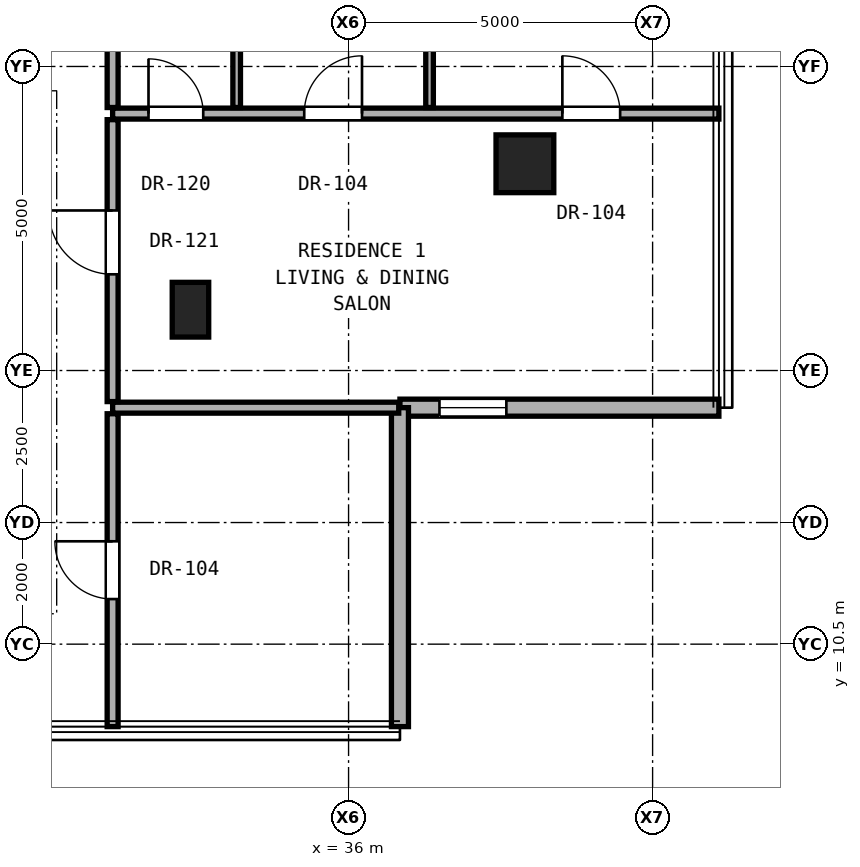
"""IFC4 building model, lengths in metres.
Left out: names, types, materials, properties, quantities, classifications, styles, units other than length and angle.
Written with IfcOpenShell. Run it as: python <this file> out.ifc"""

import sys

from ifc_helpers import new_model, si_unit, direction, frame, frame_2d, origin, origin_2d, place, context, subcontext, project, spatial, rectangle, hollow_rectangle, extrude, element, fill, save


model = new_model("IFC4")
c1 = context("Model", 3, precision=1e-05, world=origin(), true_north=direction((0.0, 1.0)))
c2 = subcontext(c1, "Body", "Model", "MODEL_VIEW")
j1 = project(units=[si_unit("LENGTHUNIT", "METRE"), si_unit("PLANEANGLEUNIT", "RADIAN")], contexts=[c1])
p1 = place(None, origin())
s1 = spatial("IfcSite", under=j1, at=p1, CompositionType="ELEMENT")
p2 = place(p1, origin())
s2 = spatial("IfcBuilding", under=s1, at=p2, CompositionType="ELEMENT")
p3 = place(p2, frame((0.0, 0.0, 177.15)))
s3 = spatial("IfcBuildingStorey", under=s2, at=p3, CompositionType="ELEMENT", Elevation=177.15)
p4 = place(p3, frame((38.9, 18.4, 0.0), z_axis=(0.0, 0.0, 1.0), x_axis=(1.0, 0.0, 0.0)))
e1 = element("IfcColumn", 1, at=p4, inside=s3, PredefinedType="COLUMN", context=c2, shape_type="SweptSolid", body=[
    extrude(hollow_rectangle(XDim=0.95, YDim=0.95, WallThickness=0.05, at=origin_2d()), origin(), (0.0, 0.0, 1.0), 3.25),
])
p5 = place(p3, frame((33.4, 16.0, 0.0), z_axis=(0.0, 0.0, 1.0), x_axis=(1.0, 0.0, 0.0)))
e2 = element("IfcColumn", 2, at=p5, inside=s3, PredefinedType="PILASTER", context=c2, shape_type="SweptSolid", body=[
    extrude(rectangle(XDim=0.6, YDim=0.9, at=origin_2d()), origin(), (0.0, 0.0, 1.0), 3.25),
])
p6 = place(p3, frame((36.845, 14.389, 0.0), z_axis=(0.0, 0.0, 1.0), x_axis=(1.0, 0.0, 0.0)))
e3 = element("IfcWall", 3, at=p6, inside=s3, PredefinedType="SOLIDWALL", context=c2, shape_type="SweptSolid", body=[
    extrude(rectangle(XDim=5.245, YDim=0.28, at=frame_2d((2.623, 0.0))), origin(), (0.0, 0.0, 1.0), 3.03),
])
p7 = place(p6, frame((0.65, 0.0, 0.85)))
e4 = element("IfcOpeningElement", 4, at=p7, cuts=e3, PredefinedType="OPENING", context=c2, shape_type="SweptSolid", body=[
    extrude(rectangle(XDim=1.1, YDim=2.0, at=frame_2d((0.55, 1.0))), frame((0.0, 0.15, 0.0), z_axis=(0.0, -1.0, 0.0), x_axis=(1.0, 0.0, 0.0)), (0.0, 0.0, 1.0), 0.3),
])
p8 = place(p3, frame((36.845, 9.144, 0.0), z_axis=(0.0, 0.0, 1.0), x_axis=(0.0, 1.0, 0.0)))
e5 = element("IfcWall", 5, at=p8, inside=s3, PredefinedType="SOLIDWALL", context=c2, shape_type="SweptSolid", body=[
    extrude(rectangle(XDim=5.245, YDim=0.28, at=frame_2d((2.623, 0.0))), origin(), (0.0, 0.0, 1.0), 3.03),
])
p9 = place(p3, frame((32.12, 14.389, 0.0), z_axis=(0.0, 0.0, 1.0), x_axis=(1.0, 0.0, 0.0)))
e6 = element("IfcWall", 6, at=p9, inside=s3, PredefinedType="PARTITIONING", context=c2, shape_type="SweptSolid", body=[
    extrude(rectangle(XDim=4.705, YDim=0.18, at=frame_2d((2.353, 0.0))), origin(), (0.0, 0.0, 1.0), 3.05),
])
p10 = place(p3, frame((32.12, 19.225, 0.0), z_axis=(0.0, 0.0, 1.0), x_axis=(1.0, 0.0, 0.0)))
e7 = element("IfcWall", 7, at=p10, inside=s3, PredefinedType="PARTITIONING", context=c2, shape_type="SweptSolid", body=[
    extrude(rectangle(XDim=9.97, YDim=0.18, at=frame_2d((4.985, 0.0))), origin(), (0.0, 0.0, 1.0), 2.269),
])
p11 = place(p10, frame((7.396, 0.0, 0.0)))
e8 = element("IfcOpeningElement", 8, at=p11, cuts=e7, PredefinedType="OPENING", context=c2, shape_type="SweptSolid", body=[
    extrude(rectangle(XDim=0.95, YDim=2.15, at=frame_2d((0.475, 1.075))), frame((0.0, 0.1, 0.0), z_axis=(0.0, -1.0, 0.0), x_axis=(1.0, 0.0, 0.0)), (0.0, 0.0, 1.0), 0.2),
])
p12 = place(p10, frame((3.151, 0.0, 0.0)))
e9 = element("IfcOpeningElement", 9, at=p12, cuts=e7, PredefinedType="OPENING", context=c2, shape_type="SweptSolid", body=[
    extrude(rectangle(XDim=0.95, YDim=2.15, at=frame_2d((0.475, 1.075))), frame((0.0, 0.1, 0.0), z_axis=(0.0, -1.0, 0.0), x_axis=(1.0, 0.0, 0.0)), (0.0, 0.0, 1.0), 0.2),
])
p13 = place(p10, frame((0.59, 0.0, 0.0)))
e10 = element("IfcOpeningElement", 10, at=p13, cuts=e7, PredefinedType="OPENING", context=c2, shape_type="SweptSolid", body=[
    extrude(rectangle(XDim=0.9, YDim=2.1, at=frame_2d((0.45, 1.05))), frame((0.0, 0.1, 0.0), z_axis=(0.0, -1.0, 0.0), x_axis=(1.0, 0.0, 0.0)), (0.0, 0.0, 1.0), 0.2),
])
p14 = place(p3, frame((32.12, 9.144, 0.0), z_axis=(0.0, 0.0, 1.0), x_axis=(0.0, 1.0, 0.0)))
e11 = element("IfcWall", 11, at=p14, inside=s3, PredefinedType="PARTITIONING", context=c2, shape_type="SweptSolid", body=[
    extrude(rectangle(XDim=5.145, YDim=0.18, at=frame_2d((2.573, 0.0))), origin(), (0.0, 0.0, 1.0), 3.05),
])
p15 = place(p14, frame((2.097, 0.0, 0.0)))
e12 = element("IfcOpeningElement", 12, at=p15, cuts=e11, PredefinedType="OPENING", context=c2, shape_type="SweptSolid", body=[
    extrude(rectangle(XDim=0.95, YDim=2.15, at=frame_2d((0.475, 1.075))), frame((0.0, 0.1, 0.0), z_axis=(0.0, -1.0, 0.0), x_axis=(1.0, 0.0, 0.0)), (0.0, 0.0, 1.0), 0.2),
])
p16 = place(p3, frame((32.12, 14.489, 0.0), z_axis=(0.0, 0.0, 1.0), x_axis=(0.0, 1.0, 0.0)))
e13 = element("IfcWall", 13, at=p16, inside=s3, PredefinedType="PARTITIONING", context=c2, shape_type="SweptSolid", body=[
    extrude(rectangle(XDim=4.636, YDim=0.18, at=frame_2d((2.318, 0.0))), origin(), (0.0, 0.0, 1.0), 2.442),
])
p17 = place(p16, frame((2.093, 0.0, 0.0)))
e14 = element("IfcOpeningElement", 14, at=p17, cuts=e13, PredefinedType="OPENING", context=c2, shape_type="SweptSolid", body=[
    extrude(rectangle(XDim=1.05, YDim=2.2, at=frame_2d((0.525, 1.1))), frame((0.0, 0.1, 0.0), z_axis=(0.0, -1.0, 0.0), x_axis=(1.0, 0.0, 0.0)), (0.0, 0.0, 1.0), 0.2),
])
p18 = place(p3, frame((32.12, 19.325, 0.0), z_axis=(0.0, 0.0, 1.0), x_axis=(0.0, 1.0, 0.0)))
e15 = element("IfcWall", 15, at=p18, inside=s3, PredefinedType="PARTITIONING", context=c2, shape_type="SweptSolid", body=[
    extrude(rectangle(XDim=2.52, YDim=0.18, at=frame_2d((1.26, 0.0))), origin(), (0.0, 0.0, 1.0), 3.05),
])
for number, where, z_axis, x_axis in (
    (16, (34.16, 19.325, 0.0), (0.0, 0.0, 1.0), (0.0, 1.0, 0.0)),
    (17, (37.332, 19.325, 0.0), (0.0, 0.0, 1.0), (0.0, 1.0, 0.0)),
):
    element("IfcWall", number, at=place(p3, frame(where, z_axis=z_axis, x_axis=x_axis)), inside=s3, PredefinedType="PARTITIONING", context=c2, shape_type="SweptSolid", body=[
        extrude(rectangle(XDim=2.52, YDim=0.125, at=frame_2d((1.26, 0.0))), origin(), (0.0, 0.0, 1.0), 3.05),
    ])
p19 = place(p7, origin())
e18 = element("IfcWindow", 18, at=p19, inside=s3, PartitioningType="SINGLE_PANEL", PredefinedType="WINDOW", context=c2, shape_type="SweptSolid", body=[
    extrude(rectangle(XDim=1.1, YDim=2.0, at=frame_2d((0.55, 1.0))), frame((0.0, 0.03, 0.0), z_axis=(0.0, -1.0, 0.0), x_axis=(1.0, 0.0, 0.0)), (0.0, 0.0, 1.0), 0.06),
])
fill(e4, e18)
p20 = place(p17, origin())
e19 = element("IfcDoor", 19, at=p20, inside=s3, OperationType="SINGLE_SWING_RIGHT", PredefinedType="DOOR", context=c2, shape_type="SweptSolid", body=[
    extrude(rectangle(XDim=1.05, YDim=2.2, at=frame_2d((0.525, 1.1))), frame((0.0, 0.025, 0.0), z_axis=(0.0, -1.0, 0.0), x_axis=(1.0, 0.0, 0.0)), (0.0, 0.0, 1.0), 0.05),
])
fill(e14, e19)
p21 = place(p11, origin())
e20 = element("IfcDoor", 20, at=p21, inside=s3, OperationType="SINGLE_SWING_LEFT", PredefinedType="DOOR", context=c2, shape_type="SweptSolid", body=[
    extrude(rectangle(XDim=0.95, YDim=2.15, at=frame_2d((0.475, 1.075))), frame((0.0, 0.025, 0.0), z_axis=(0.0, -1.0, 0.0), x_axis=(1.0, 0.0, 0.0)), (0.0, 0.0, 1.0), 0.05),
])
fill(e8, e20)
p22 = place(p12, origin())
e21 = element("IfcDoor", 21, at=p22, inside=s3, OperationType="SINGLE_SWING_RIGHT", PredefinedType="DOOR", context=c2, shape_type="SweptSolid", body=[
    extrude(rectangle(XDim=0.95, YDim=2.15, at=frame_2d((0.475, 1.075))), frame((0.0, 0.025, 0.0), z_axis=(0.0, -1.0, 0.0), x_axis=(1.0, 0.0, 0.0)), (0.0, 0.0, 1.0), 0.05),
])
fill(e9, e21)
p23 = place(p13, origin())
e22 = element("IfcDoor", 22, at=p23, inside=s3, OperationType="SINGLE_SWING_LEFT", PredefinedType="DOOR", context=c2, shape_type="SweptSolid", body=[
    extrude(rectangle(XDim=0.9, YDim=2.1, at=frame_2d((0.45, 1.05))), frame((0.0, 0.025, 0.0), z_axis=(0.0, -1.0, 0.0), x_axis=(1.0, 0.0, 0.0)), (0.0, 0.0, 1.0), 0.05),
])
fill(e10, e22)
p24 = place(p15, origin())
e23 = element("IfcDoor", 23, at=p24, inside=s3, OperationType="SINGLE_SWING_RIGHT", PredefinedType="DOOR", context=c2, shape_type="SweptSolid", body=[
    extrude(rectangle(XDim=0.95, YDim=2.15, at=frame_2d((0.475, 1.075))), frame((0.0, 0.025, 0.0), z_axis=(0.0, -1.0, 0.0), x_axis=(1.0, 0.0, 0.0)), (0.0, 0.0, 1.0), 0.05),
])
fill(e12, e23)
save(model, sys.argv[1])
